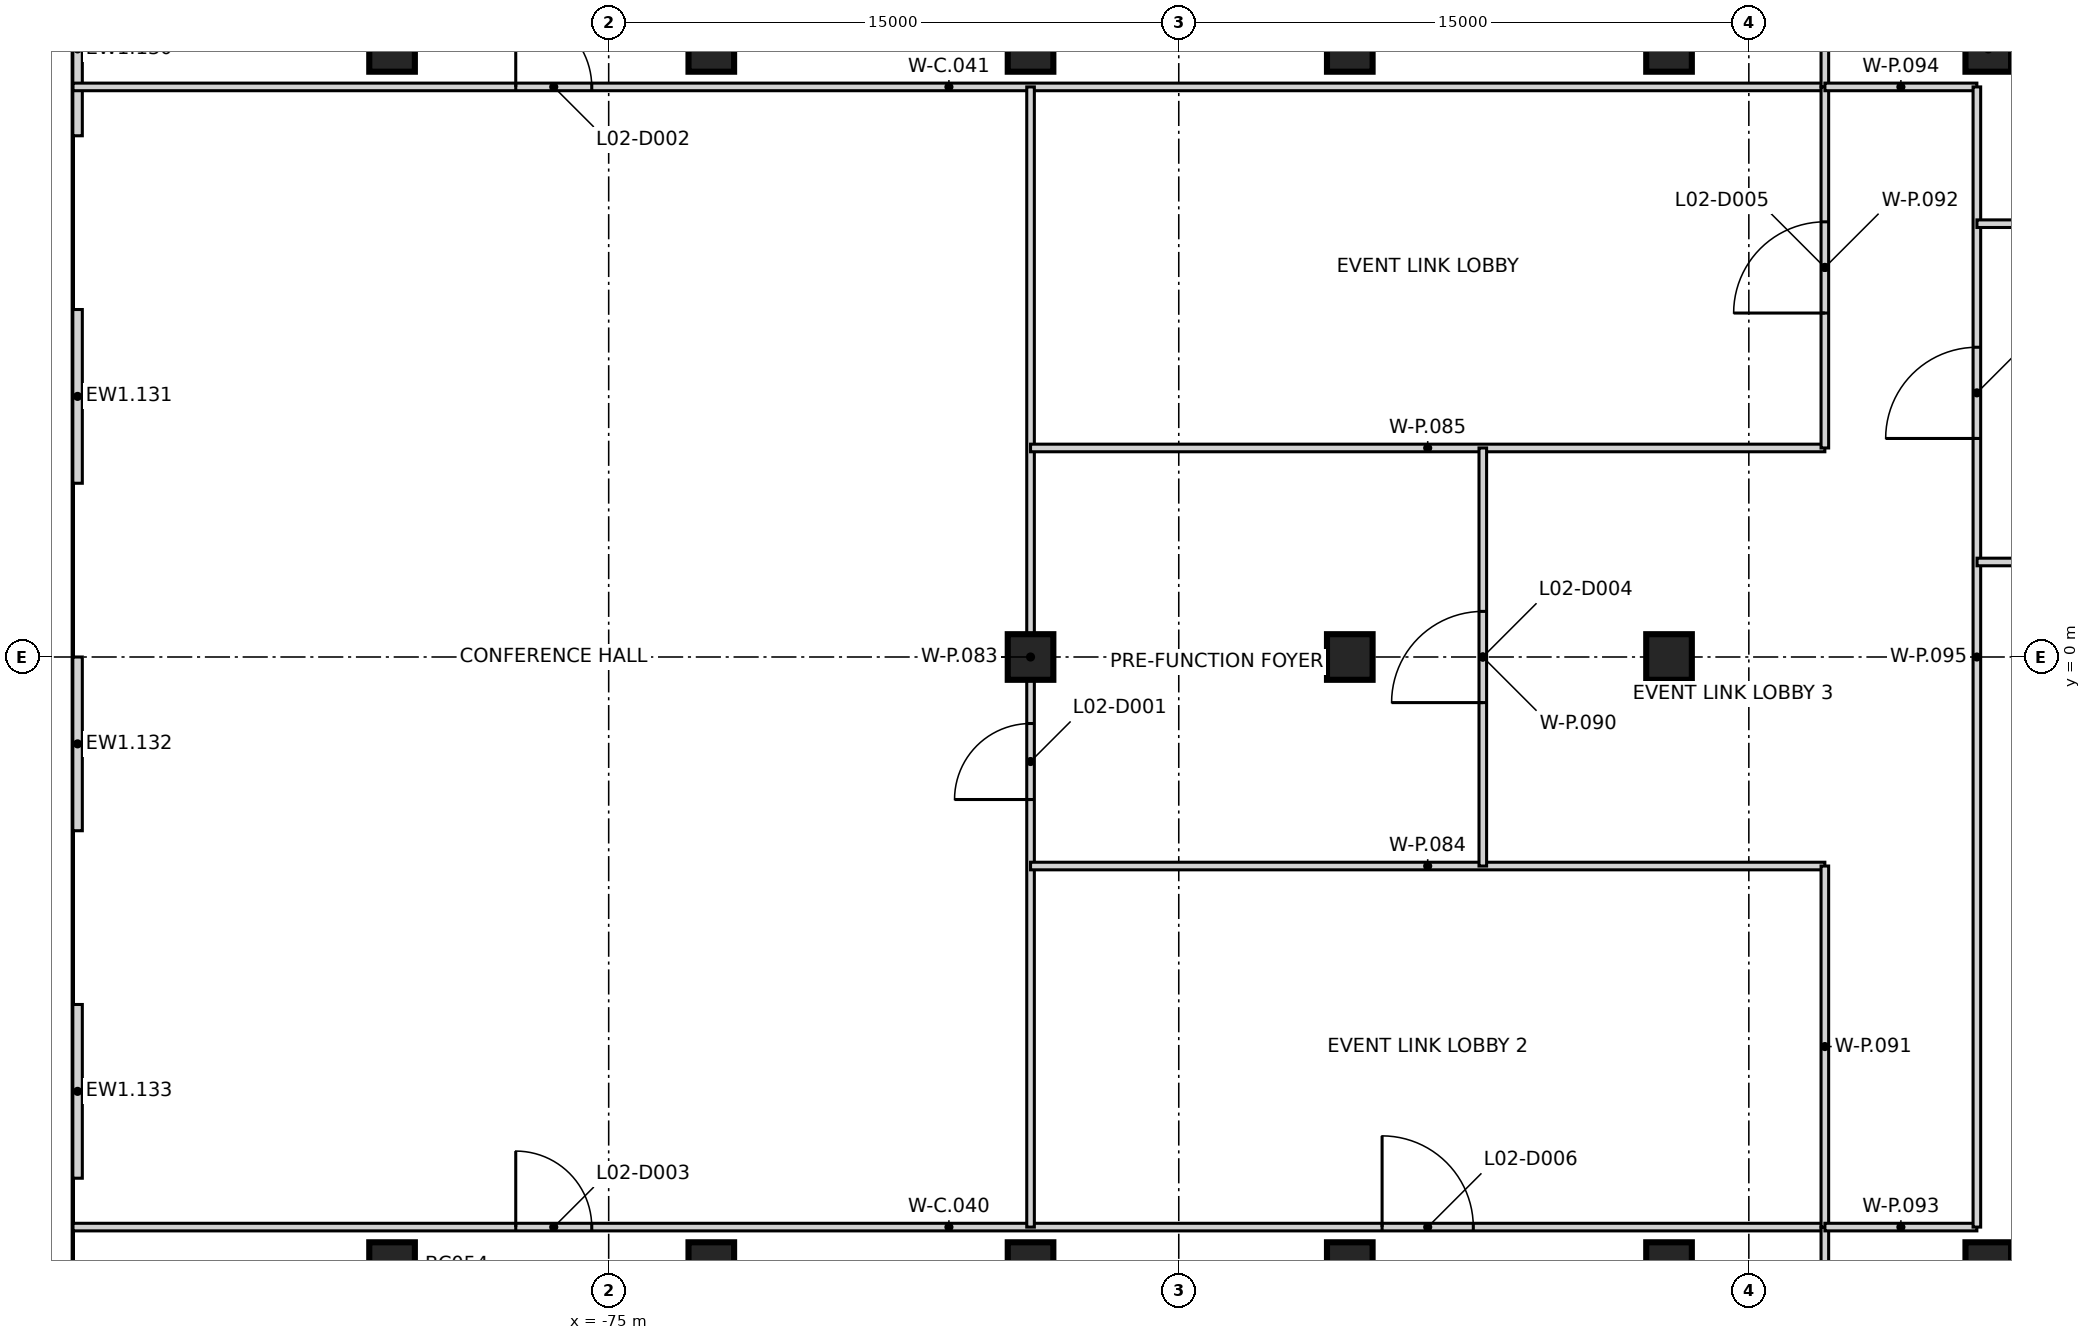
"""IFC4 building model, lengths in metres.
Left out: names, types, materials, properties, quantities, classifications, styles, units other than length and angle.
Written with IfcOpenShell. Run it as: python <this file> out.ifc"""

import sys

from ifc_helpers import new_model, si_unit, direction, frame, frame_2d, origin, origin_2d, place, context, subcontext, project, spatial, rectangle, extrude, element, fill, save


model = new_model("IFC4")
c1 = context("Model", 3, precision=1e-05, world=origin(), true_north=direction((0.0, 1.0)))
c2 = subcontext(c1, "Body", "Model", "MODEL_VIEW")
j1 = project(units=[si_unit("LENGTHUNIT", "METRE"), si_unit("PLANEANGLEUNIT", "RADIAN")], contexts=[c1])
p1 = place(None, origin())
s1 = spatial("IfcSite", under=j1, at=p1, CompositionType="ELEMENT")
p2 = place(p1, origin())
s2 = spatial("IfcBuilding", under=s1, at=p2, CompositionType="ELEMENT")
p3 = place(p2, frame((0.0, 0.0, 14.0)))
s3 = spatial("IfcBuildingStorey", under=s2, at=p3, CompositionType="ELEMENT", Elevation=14.0)
for number, where, z_axis, x_axis in (
    (1, (-80.7, -16.0, -0.35), (0.0, 0.0, 1.0), (1.0, 0.0, 0.0)),
    (2, (-80.7, 16.0, -0.35), (0.0, 0.0, 1.0), (1.0, 0.0, 0.0)),
    (3, (-72.3, -16.0, -0.35), (0.0, 0.0, 1.0), (1.0, 0.0, 0.0)),
    (4, (-72.3, 16.0, -0.35), (0.0, 0.0, 1.0), (1.0, 0.0, 0.0)),
    (5, (-63.9, -16.0, -0.35), (0.0, 0.0, 1.0), (1.0, 0.0, 0.0)),
    (6, (-63.9, 0.0, -0.35), (0.0, 0.0, 1.0), (1.0, 0.0, 0.0)),
    (7, (-63.9, 16.0, -0.35), (0.0, 0.0, 1.0), (1.0, 0.0, 0.0)),
    (8, (-55.5, -16.0, -0.35), (0.0, 0.0, 1.0), (1.0, 0.0, 0.0)),
    (9, (-55.5, 0.0, -0.35), (0.0, 0.0, 1.0), (1.0, 0.0, 0.0)),
    (10, (-55.5, 16.0, -0.35), (0.0, 0.0, 1.0), (1.0, 0.0, 0.0)),
    (11, (-47.1, -16.0, -0.35), (0.0, 0.0, 1.0), (1.0, 0.0, 0.0)),
    (12, (-47.1, 0.0, -0.35), (0.0, 0.0, 1.0), (1.0, 0.0, 0.0)),
    (13, (-47.1, 16.0, -0.35), (0.0, 0.0, 1.0), (1.0, 0.0, 0.0)),
    (14, (-38.7, -16.0, -0.35), (0.0, 0.0, 1.0), (1.0, 0.0, 0.0)),
    (15, (-38.7, 16.0, -0.35), (0.0, 0.0, 1.0), (1.0, 0.0, 0.0)),
):
    element("IfcColumn", number, at=place(p3, frame(where, z_axis=z_axis, x_axis=x_axis)), inside=s3, PredefinedType="COLUMN", context=c2, shape_type="SweptSolid", body=[
        extrude(rectangle(XDim=1.2, YDim=1.2, at=origin_2d()), origin(), (0.0, 0.0, 1.0), 5.5),
    ])
for number, where, z_axis, x_axis in (
    (16, (-88.975, 13.714, 0.0), (0.0, 0.0, 1.0), (0.0, 1.0, 0.0)),
    (17, (-88.975, 4.572, 0.0), (0.0, 0.0, 1.0), (0.0, 1.0, 0.0)),
):
    element("IfcWall", number, at=place(p3, frame(where, z_axis=z_axis, x_axis=x_axis)), inside=s3, PredefinedType="SOLIDWALL", context=c2, shape_type="SweptSolid", body=[
        extrude(rectangle(XDim=4.571, YDim=0.25, at=frame_2d((2.286, 0.0))), origin(), (0.0, 0.0, 1.0), 5.15),
    ])
for number, where, z_axis, x_axis in (
    (18, (-88.975, -4.572, 0.0), (0.0, 0.0, 1.0), (0.0, 1.0, 0.0)),
    (19, (-88.975, -13.714, 0.0), (0.0, 0.0, 1.0), (0.0, 1.0, 0.0)),
):
    element("IfcWall", number, at=place(p3, frame(where, z_axis=z_axis, x_axis=x_axis)), inside=s3, PredefinedType="SOLIDWALL", context=c2, shape_type="SweptSolid", body=[
        extrude(rectangle(XDim=4.572, YDim=0.25, at=frame_2d((2.286, 0.0))), origin(), (0.0, 0.0, 1.0), 5.15),
    ])
p4 = place(p3, frame((-89.095, -15.0, 0.0), z_axis=(0.0, 0.0, 1.0), x_axis=(1.0, 0.0, 0.0)))
e20 = element("IfcWall", 20, at=p4, inside=s3, PredefinedType="PARTITIONING", context=c2, shape_type="SweptSolid", body=[
    extrude(rectangle(XDim=46.095, YDim=0.2, at=frame_2d((23.047, 0.0))), origin(), (0.0, 0.0, 1.0), 5.15),
])
p5 = place(p4, frame((11.649, 0.0, 0.0)))
e21 = element("IfcOpeningElement", 21, at=p5, cuts=e20, PredefinedType="OPENING", context=c2, shape_type="SweptSolid", body=[
    extrude(rectangle(XDim=2.0, YDim=2.1, at=frame_2d((1.0, 1.05))), frame((0.0, 0.11, 0.0), z_axis=(0.0, -1.0, 0.0), x_axis=(1.0, 0.0, 0.0)), (0.0, 0.0, 1.0), 0.22),
])
p6 = place(p4, frame((34.445, 0.0, 0.0)))
e22 = element("IfcOpeningElement", 22, at=p6, cuts=e20, PredefinedType="OPENING", context=c2, shape_type="SweptSolid", body=[
    extrude(rectangle(XDim=2.4, YDim=2.1, at=frame_2d((1.2, 1.05))), frame((0.0, 0.11, 0.0), z_axis=(0.0, -1.0, 0.0), x_axis=(1.0, 0.0, 0.0)), (0.0, 0.0, 1.0), 0.22),
])
p7 = place(p3, frame((-89.095, 15.0, 0.0), z_axis=(0.0, 0.0, 1.0), x_axis=(1.0, 0.0, 0.0)))
e23 = element("IfcWall", 23, at=p7, inside=s3, PredefinedType="PARTITIONING", context=c2, shape_type="SweptSolid", body=[
    extrude(rectangle(XDim=46.095, YDim=0.2, at=frame_2d((23.047, 0.0))), origin(), (0.0, 0.0, 1.0), 5.15),
])
p8 = place(p7, frame((11.649, 0.0, 0.0)))
e24 = element("IfcOpeningElement", 24, at=p8, cuts=e23, PredefinedType="OPENING", context=c2, shape_type="SweptSolid", body=[
    extrude(rectangle(XDim=2.0, YDim=2.1, at=frame_2d((1.0, 1.05))), frame((0.0, 0.11, 0.0), z_axis=(0.0, -1.0, 0.0), x_axis=(1.0, 0.0, 0.0)), (0.0, 0.0, 1.0), 0.22),
])
for number, where, z_axis, x_axis in (
    (25, (-43.0, -19.5, 0.0), (0.0, 0.0, 1.0), (0.0, 1.0, 0.0)),
    (26, (-43.0, 15.002, 0.0), (0.0, 0.0, 1.0), (0.0, 1.0, 0.0)),
):
    element("IfcWall", number, at=place(p3, frame(where, z_axis=z_axis, x_axis=x_axis)), inside=s3, PredefinedType="PARTITIONING", context=c2, shape_type="SweptSolid", body=[
        extrude(rectangle(XDim=4.498, YDim=0.2, at=frame_2d((2.249, 0.0))), origin(), (0.0, 0.0, 1.0), 5.15),
    ])
p9 = place(p3, frame((-63.9, -15.0, 0.0), z_axis=(0.0, 0.0, 1.0), x_axis=(0.0, 1.0, 0.0)))
e27 = element("IfcWall", 27, at=p9, inside=s3, PredefinedType="PARTITIONING", context=c2, shape_type="SweptSolid", body=[
    extrude(rectangle(XDim=30.0, YDim=0.2, at=frame_2d((15.0, 0.0))), origin(), (0.0, 0.0, 1.0), 5.15),
])
p10 = place(p9, frame((11.25, 0.0, 0.0)))
e28 = element("IfcOpeningElement", 28, at=p10, cuts=e27, PredefinedType="OPENING", context=c2, shape_type="SweptSolid", body=[
    extrude(rectangle(XDim=2.0, YDim=2.1, at=frame_2d((1.0, 1.05))), frame((0.0, 0.11, 0.0), z_axis=(0.0, -1.0, 0.0), x_axis=(1.0, 0.0, 0.0)), (0.0, 0.0, 1.0), 0.22),
])
for number, where, z_axis, x_axis in (
    (29, (-63.9, -5.5, 0.0), (0.0, 0.0, 1.0), (1.0, 0.0, 0.0)),
    (30, (-63.9, 5.5, 0.0), (0.0, 0.0, 1.0), (1.0, 0.0, 0.0)),
):
    element("IfcWall", number, at=place(p3, frame(where, z_axis=z_axis, x_axis=x_axis)), inside=s3, PredefinedType="PARTITIONING", context=c2, shape_type="SweptSolid", body=[
        extrude(rectangle(XDim=20.9, YDim=0.2, at=frame_2d((10.45, 0.0))), origin(), (0.0, 0.0, 1.0), 5.15),
    ])
p11 = place(p3, frame((-52.0, -5.5, 0.0), z_axis=(0.0, 0.0, 1.0), x_axis=(0.0, 1.0, 0.0)))
e31 = element("IfcWall", 31, at=p11, inside=s3, PredefinedType="PARTITIONING", context=c2, shape_type="SweptSolid", body=[
    extrude(rectangle(XDim=11.0, YDim=0.2, at=frame_2d((5.5, 0.0))), origin(), (0.0, 0.0, 1.0), 5.15),
])
p12 = place(p11, frame((4.3, 0.0, 0.0)))
e32 = element("IfcOpeningElement", 32, at=p12, cuts=e31, PredefinedType="OPENING", context=c2, shape_type="SweptSolid", body=[
    extrude(rectangle(XDim=2.4, YDim=2.1, at=frame_2d((1.2, 1.05))), frame((0.0, 0.11, 0.0), z_axis=(0.0, -1.0, 0.0), x_axis=(1.0, 0.0, 0.0)), (0.0, 0.0, 1.0), 0.22),
])
p13 = place(p3, frame((-43.0, -15.0, 0.0), z_axis=(0.0, 0.0, 1.0), x_axis=(0.0, 1.0, 0.0)))
e33 = element("IfcWall", 33, at=p13, inside=s3, PredefinedType="PARTITIONING", context=c2, shape_type="SweptSolid", body=[
    extrude(rectangle(XDim=9.5, YDim=0.2, at=frame_2d((4.75, 0.0))), origin(), (0.0, 0.0, 1.0), 5.15),
])
p14 = place(p3, frame((-43.0, 5.5, 0.0), z_axis=(0.0, 0.0, 1.0), x_axis=(0.0, 1.0, 0.0)))
e34 = element("IfcWall", 34, at=p14, inside=s3, PredefinedType="PARTITIONING", context=c2, shape_type="SweptSolid", body=[
    extrude(rectangle(XDim=9.5, YDim=0.2, at=frame_2d((4.75, 0.0))), origin(), (0.0, 0.0, 1.0), 5.15),
])
p15 = place(p14, frame((3.55, 0.0, 0.0)))
e35 = element("IfcOpeningElement", 35, at=p15, cuts=e34, PredefinedType="OPENING", context=c2, shape_type="SweptSolid", body=[
    extrude(rectangle(XDim=2.4, YDim=2.1, at=frame_2d((1.2, 1.05))), frame((0.0, 0.11, 0.0), z_axis=(0.0, -1.0, 0.0), x_axis=(1.0, 0.0, 0.0)), (0.0, 0.0, 1.0), 0.22),
])
for number, where, z_axis, x_axis in (
    (36, (-42.998, -15.0, 0.0), (0.0, 0.0, 1.0), (1.0, 0.0, 0.0)),
    (37, (-42.998, 15.0, 0.0), (0.0, 0.0, 1.0), (1.0, 0.0, 0.0)),
):
    element("IfcWall", number, at=place(p3, frame(where, z_axis=z_axis, x_axis=x_axis)), inside=s3, PredefinedType="PARTITIONING", context=c2, shape_type="SweptSolid", body=[
        extrude(rectangle(XDim=3.998, YDim=0.2, at=frame_2d((1.999, 0.0))), origin(), (0.0, 0.0, 1.0), 5.15),
    ])
p16 = place(p3, frame((-39.0, -15.0, 0.0), z_axis=(0.0, 0.0, 1.0), x_axis=(0.0, 1.0, 0.0)))
e38 = element("IfcWall", 38, at=p16, inside=s3, PredefinedType="PARTITIONING", context=c2, shape_type="SweptSolid", body=[
    extrude(rectangle(XDim=30.0, YDim=0.2, at=frame_2d((15.0, 0.0))), origin(), (0.0, 0.0, 1.0), 5.15),
])
p17 = place(p16, frame((20.75, 0.0, 0.0)))
e39 = element("IfcOpeningElement", 39, at=p17, cuts=e38, PredefinedType="OPENING", context=c2, shape_type="SweptSolid", body=[
    extrude(rectangle(XDim=2.4, YDim=2.1, at=frame_2d((1.2, 1.05))), frame((0.0, 0.11, 0.0), z_axis=(0.0, -1.0, 0.0), x_axis=(1.0, 0.0, 0.0)), (0.0, 0.0, 1.0), 0.22),
])
p18 = place(p3, frame((-38.998, 11.401, 0.0), z_axis=(0.0, 0.0, 1.0), x_axis=(1.0, 0.0, 0.0)))
e40 = element("IfcWall", 40, at=p18, inside=s3, PredefinedType="PARTITIONING", context=c2, shape_type="SweptSolid", body=[
    extrude(rectangle(XDim=29.995, YDim=0.2, at=frame_2d((14.998, 0.0))), origin(), (0.0, 0.0, 1.0), 2.75),
])
p19 = place(p18, frame((25.143, 0.0, 0.0)))
e41 = element("IfcOpeningElement", 41, at=p19, cuts=e40, PredefinedType="OPENING", context=c2, shape_type="SweptSolid", body=[
    extrude(rectangle(XDim=1.0, YDim=2.1, at=frame_2d((0.5, 1.05))), frame((0.0, 0.11, 0.0), z_axis=(0.0, -1.0, 0.0), x_axis=(1.0, 0.0, 0.0)), (0.0, 0.0, 1.0), 0.22),
])
p20 = place(p18, frame((7.76, 0.0, 0.0)))
e42 = element("IfcOpeningElement", 42, at=p20, cuts=e40, PredefinedType="OPENING", context=c2, shape_type="SweptSolid", body=[
    extrude(rectangle(XDim=0.8, YDim=2.1, at=frame_2d((0.4, 1.05))), frame((0.0, 0.11, 0.0), z_axis=(0.0, -1.0, 0.0), x_axis=(1.0, 0.0, 0.0)), (0.0, 0.0, 1.0), 0.22),
])
p21 = place(p18, frame((16.034, 0.0, 0.0)))
e43 = element("IfcOpeningElement", 43, at=p21, cuts=e40, PredefinedType="OPENING", context=c2, shape_type="SweptSolid", body=[
    extrude(rectangle(XDim=0.9, YDim=2.1, at=frame_2d((0.45, 1.05))), frame((0.0, 0.11, 0.0), z_axis=(0.0, -1.0, 0.0), x_axis=(1.0, 0.0, 0.0)), (0.0, 0.0, 1.0), 0.22),
])
p22 = place(p3, frame((-38.995, 2.5, 0.0), z_axis=(0.0, 0.0, 1.0), x_axis=(1.0, 0.0, 0.0)))
e44 = element("IfcWall", 44, at=p22, inside=s3, PredefinedType="PARTITIONING", context=c2, shape_type="SweptSolid", body=[
    extrude(rectangle(XDim=13.292, YDim=0.2, at=frame_2d((6.646, 0.0))), origin(), (0.0, 0.0, 1.0), 5.15),
])
p23 = place(p22, frame((6.146, 0.0, 0.0)))
e45 = element("IfcOpeningElement", 45, at=p23, cuts=e44, PredefinedType="OPENING", context=c2, shape_type="SweptSolid", body=[
    extrude(rectangle(XDim=1.0, YDim=2.1, at=frame_2d((0.5, 1.05))), frame((0.0, 0.11, 0.0), z_axis=(0.0, -1.0, 0.0), x_axis=(1.0, 0.0, 0.0)), (0.0, 0.0, 1.0), 0.22),
])
p24 = place(p10, origin())
e46 = element("IfcDoor", 46, at=p24, inside=s3, OperationType="DOUBLE_DOOR_SINGLE_SWING", PredefinedType="DOOR", context=c2, shape_type="SweptSolid", body=[
    extrude(rectangle(XDim=2.0, YDim=2.1, at=frame_2d((1.0, 1.05))), frame((0.0, 0.025, 0.0), z_axis=(0.0, -1.0, 0.0), x_axis=(1.0, 0.0, 0.0)), (0.0, 0.0, 1.0), 0.05),
])
fill(e28, e46)
p25 = place(p8, frame((2.0, 0.0, 0.0), z_axis=(0.0, 0.0, 1.0), x_axis=(-1.0, 0.0, 0.0)))
e47 = element("IfcDoor", 47, at=p25, inside=s3, OperationType="DOUBLE_DOOR_SINGLE_SWING", PredefinedType="DOOR", context=c2, shape_type="SweptSolid", body=[
    extrude(rectangle(XDim=2.0, YDim=2.1, at=frame_2d((1.0, 1.05))), frame((0.0, 0.025, 0.0), z_axis=(0.0, -1.0, 0.0), x_axis=(1.0, 0.0, 0.0)), (0.0, 0.0, 1.0), 0.05),
])
fill(e24, e47)
p26 = place(p5, origin())
e48 = element("IfcDoor", 48, at=p26, inside=s3, OperationType="DOUBLE_DOOR_SINGLE_SWING", PredefinedType="DOOR", context=c2, shape_type="SweptSolid", body=[
    extrude(rectangle(XDim=2.0, YDim=2.1, at=frame_2d((1.0, 1.05))), frame((0.0, 0.025, 0.0), z_axis=(0.0, -1.0, 0.0), x_axis=(1.0, 0.0, 0.0)), (0.0, 0.0, 1.0), 0.05),
])
fill(e21, e48)
p27 = place(p12, origin())
e49 = element("IfcDoor", 49, at=p27, inside=s3, OperationType="DOUBLE_DOOR_SINGLE_SWING", PredefinedType="DOOR", context=c2, shape_type="SweptSolid", body=[
    extrude(rectangle(XDim=2.4, YDim=2.1, at=frame_2d((1.2, 1.05))), frame((0.0, 0.025, 0.0), z_axis=(0.0, -1.0, 0.0), x_axis=(1.0, 0.0, 0.0)), (0.0, 0.0, 1.0), 0.05),
])
fill(e32, e49)
p28 = place(p15, origin())
e50 = element("IfcDoor", 50, at=p28, inside=s3, OperationType="DOUBLE_DOOR_SINGLE_SWING", PredefinedType="DOOR", context=c2, shape_type="SweptSolid", body=[
    extrude(rectangle(XDim=2.4, YDim=2.1, at=frame_2d((1.2, 1.05))), frame((0.0, 0.025, 0.0), z_axis=(0.0, -1.0, 0.0), x_axis=(1.0, 0.0, 0.0)), (0.0, 0.0, 1.0), 0.05),
])
fill(e35, e50)
p29 = place(p6, origin())
e51 = element("IfcDoor", 51, at=p29, inside=s3, OperationType="DOUBLE_DOOR_SINGLE_SWING", PredefinedType="DOOR", context=c2, shape_type="SweptSolid", body=[
    extrude(rectangle(XDim=2.4, YDim=2.1, at=frame_2d((1.2, 1.05))), frame((0.0, 0.025, 0.0), z_axis=(0.0, -1.0, 0.0), x_axis=(1.0, 0.0, 0.0)), (0.0, 0.0, 1.0), 0.05),
])
fill(e22, e51)
p30 = place(p17, frame((2.4, 0.0, 0.0), z_axis=(0.0, 0.0, 1.0), x_axis=(-1.0, 0.0, 0.0)))
e52 = element("IfcDoor", 52, at=p30, inside=s3, OperationType="DOUBLE_DOOR_SINGLE_SWING", PredefinedType="DOOR", context=c2, shape_type="SweptSolid", body=[
    extrude(rectangle(XDim=2.4, YDim=2.1, at=frame_2d((1.2, 1.05))), frame((0.0, 0.025, 0.0), z_axis=(0.0, -1.0, 0.0), x_axis=(1.0, 0.0, 0.0)), (0.0, 0.0, 1.0), 0.05),
])
fill(e39, e52)
save(model, sys.argv[1])
